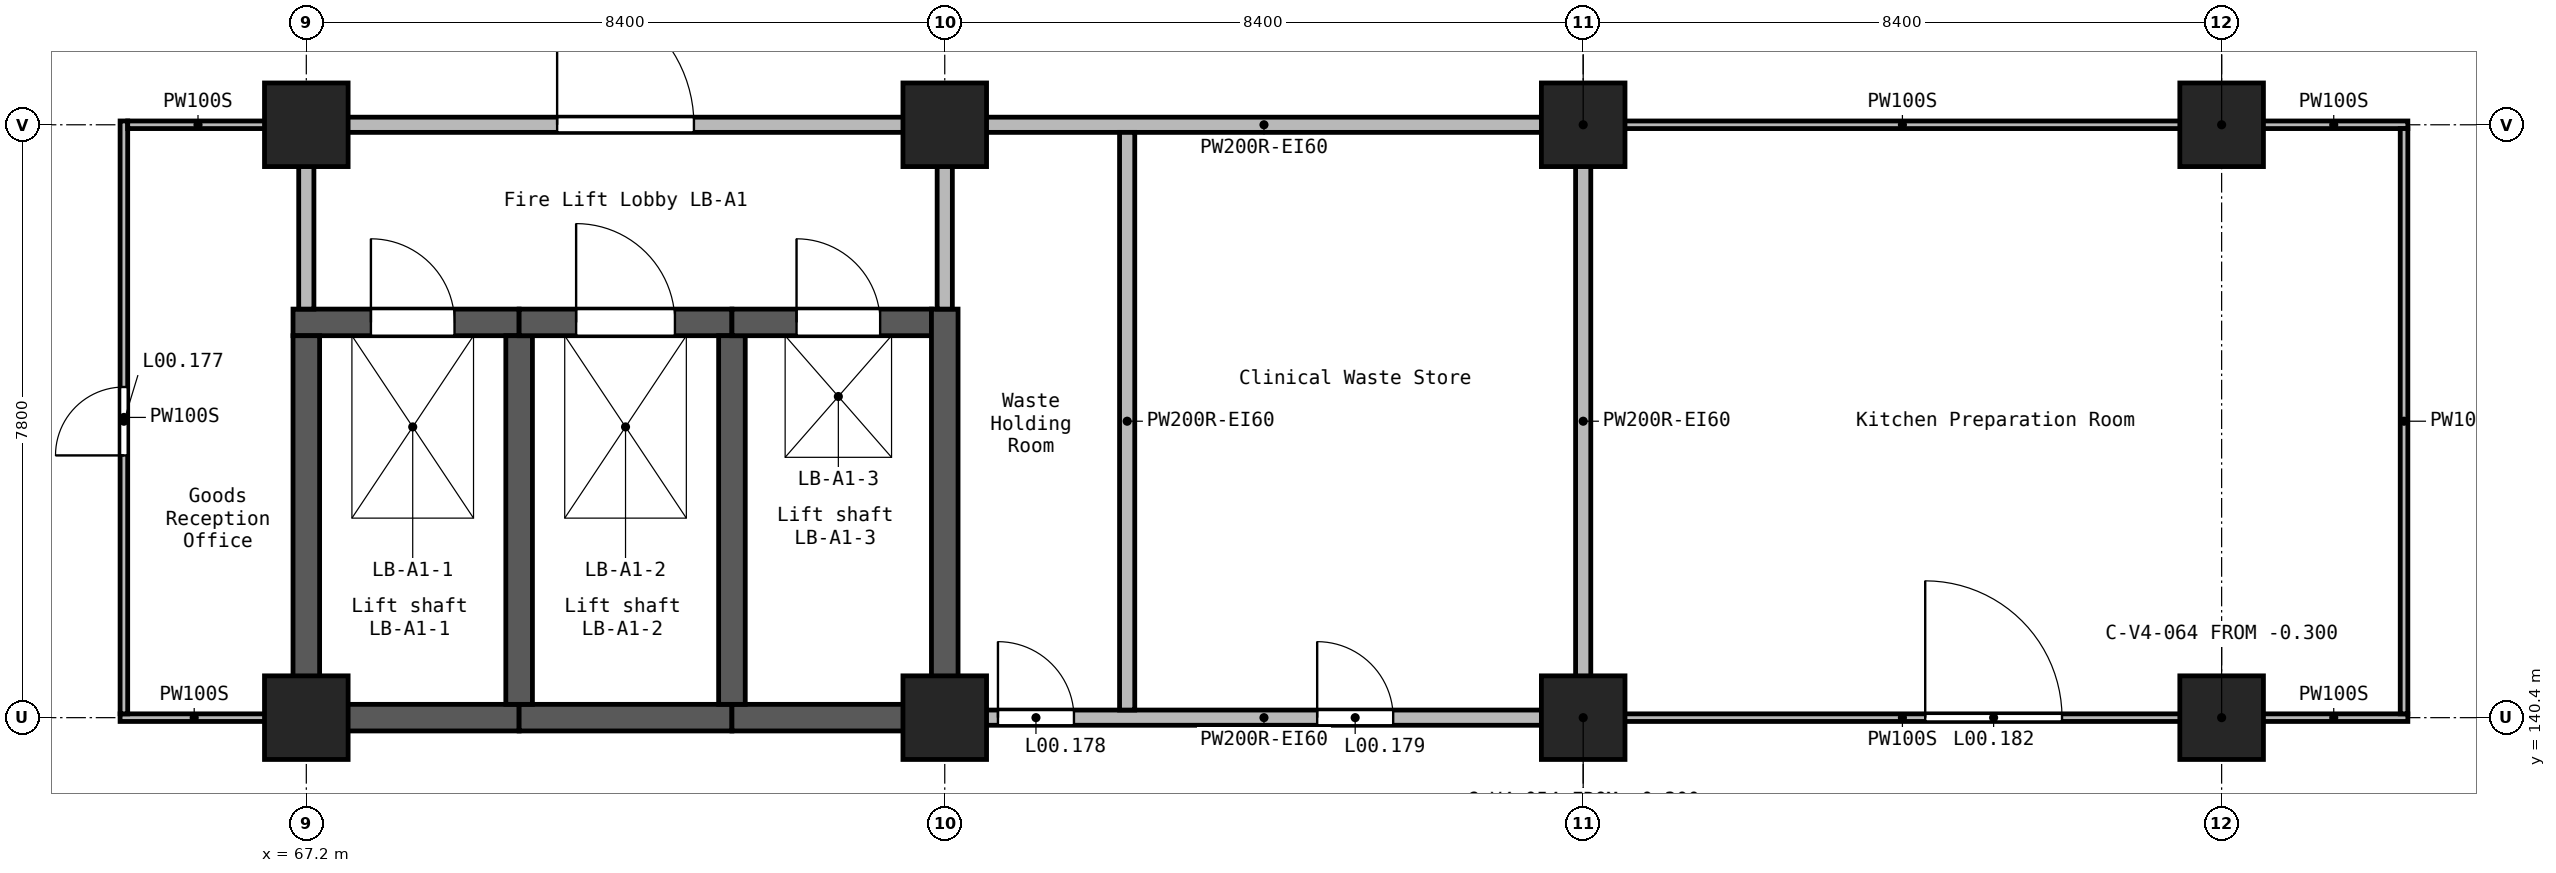
"""IFC4 building model, lengths in metres.
Left out: names, types, materials, properties, quantities, classifications, styles, units other than length and angle.
Written with IfcOpenShell. Run it as: python <this file> out.ifc"""

import sys

from ifc_helpers import new_model, si_unit, direction, frame, frame_2d, origin, origin_2d, place, context, subcontext, project, spatial, rectangle, extrude, element, fill, save


model = new_model("IFC4")
c1 = context("Model", 3, precision=1e-05, world=origin(), true_north=direction((0.0, 1.0)))
c2 = subcontext(c1, "Body", "Model", "MODEL_VIEW")
j1 = project(units=[si_unit("LENGTHUNIT", "METRE"), si_unit("PLANEANGLEUNIT", "RADIAN")], contexts=[c1])
p1 = place(None, origin())
s1 = spatial("IfcSite", under=j1, at=p1, CompositionType="ELEMENT")
p2 = place(p1, origin())
s2 = spatial("IfcBuilding", under=s1, at=p2, CompositionType="ELEMENT")
p3 = place(p2, origin())
s3 = spatial("IfcBuildingStorey", under=s2, at=p3, CompositionType="ELEMENT", Elevation=0.0)
for number, where, z_axis, x_axis in (
    (1, (67.2, 140.4, -0.3), (0.0, 0.0, 1.0), (1.0, 0.0, 0.0)),
    (2, (67.2, 148.2, -0.3), (0.0, 0.0, 1.0), (1.0, 0.0, 0.0)),
    (3, (75.6, 140.4, -0.3), (0.0, 0.0, 1.0), (1.0, 0.0, 0.0)),
    (4, (75.6, 148.2, -0.3), (0.0, 0.0, 1.0), (1.0, 0.0, 0.0)),
    (5, (84.0, 140.4, -0.3), (0.0, 0.0, 1.0), (1.0, 0.0, 0.0)),
    (6, (84.0, 148.2, -0.3), (0.0, 0.0, 1.0), (1.0, 0.0, 0.0)),
    (7, (92.4, 140.4, -0.3), (0.0, 0.0, 1.0), (1.0, 0.0, 0.0)),
    (8, (92.4, 148.2, -0.3), (0.0, 0.0, 1.0), (1.0, 0.0, 0.0)),
):
    element("IfcColumn", number, at=place(p3, frame(where, z_axis=z_axis, x_axis=x_axis)), inside=s3, PredefinedType="COLUMN", context=c2, shape_type="SweptSolid", body=[
        extrude(rectangle(XDim=1.1, YDim=1.1, at=origin_2d()), origin(), (0.0, 0.0, 1.0), 5.7),
    ])
p4 = place(p3, frame((67.025, 145.6, -0.3), z_axis=(0.0, 0.0, 1.0), x_axis=(1.0, 0.0, 0.0)))
e9 = element("IfcWall", 9, at=p4, inside=s3, PredefinedType="SHEAR", context=c2, shape_type="SweptSolid", body=[
    extrude(rectangle(XDim=2.975, YDim=0.35, at=frame_2d((1.488, 0.0))), origin(), (0.0, 0.0, 1.0), 5.7),
])
p5 = place(p4, frame((1.025, 0.0, 0.3)))
e10 = element("IfcOpeningElement", 10, at=p5, cuts=e9, PredefinedType="OPENING", context=c2, shape_type="SweptSolid", body=[
    extrude(rectangle(XDim=1.1, YDim=2.1, at=frame_2d((0.55, 1.05))), frame((0.0, 0.185, 0.0), z_axis=(0.0, -1.0, 0.0), x_axis=(1.0, 0.0, 0.0)), (0.0, 0.0, 1.0), 0.37),
])
p6 = place(p3, frame((67.2, 140.225, -0.3), z_axis=(0.0, 0.0, 1.0), x_axis=(0.0, 1.0, 0.0)))
e11 = element("IfcWall", 11, at=p6, inside=s3, PredefinedType="SHEAR", context=c2, shape_type="SweptSolid", body=[
    extrude(rectangle(XDim=5.2, YDim=0.35, at=frame_2d((2.6, 0.0))), origin(), (0.0, 0.0, 1.0), 5.7),
])
p7 = place(p3, frame((67.375, 140.4, -0.3), z_axis=(0.0, 0.0, 1.0), x_axis=(1.0, 0.0, 0.0)))
e12 = element("IfcWall", 12, at=p7, inside=s3, PredefinedType="SHEAR", context=c2, shape_type="SweptSolid", body=[
    extrude(rectangle(XDim=2.625, YDim=0.35, at=frame_2d((1.312, 0.0))), origin(), (0.0, 0.0, 1.0), 5.7),
])
p8 = place(p3, frame((70.0, 140.4, -0.3), z_axis=(0.0, 0.0, 1.0), x_axis=(1.0, 0.0, 0.0)))
e13 = element("IfcWall", 13, at=p8, inside=s3, PredefinedType="SHEAR", context=c2, shape_type="SweptSolid", body=[
    extrude(rectangle(XDim=2.8, YDim=0.35, at=frame_2d((1.4, 0.0))), origin(), (0.0, 0.0, 1.0), 5.7),
])
p9 = place(p3, frame((70.0, 140.575, -0.3), z_axis=(0.0, 0.0, 1.0), x_axis=(0.0, 1.0, 0.0)))
e14 = element("IfcWall", 14, at=p9, inside=s3, PredefinedType="SHEAR", context=c2, shape_type="SweptSolid", body=[
    extrude(rectangle(XDim=4.85, YDim=0.35, at=frame_2d((2.425, 0.0))), origin(), (0.0, 0.0, 1.0), 5.7),
])
p10 = place(p3, frame((70.0, 145.6, -0.3), z_axis=(0.0, 0.0, 1.0), x_axis=(1.0, 0.0, 0.0)))
e15 = element("IfcWall", 15, at=p10, inside=s3, PredefinedType="SHEAR", context=c2, shape_type="SweptSolid", body=[
    extrude(rectangle(XDim=2.8, YDim=0.35, at=frame_2d((1.4, 0.0))), origin(), (0.0, 0.0, 1.0), 5.7),
])
p11 = place(p10, frame((0.75, 0.0, 0.3)))
e16 = element("IfcOpeningElement", 16, at=p11, cuts=e15, PredefinedType="OPENING", context=c2, shape_type="SweptSolid", body=[
    extrude(rectangle(XDim=1.3, YDim=2.1, at=frame_2d((0.65, 1.05))), frame((0.0, 0.185, 0.0), z_axis=(0.0, -1.0, 0.0), x_axis=(1.0, 0.0, 0.0)), (0.0, 0.0, 1.0), 0.37),
])
p12 = place(p3, frame((72.8, 140.4, -0.3), z_axis=(0.0, 0.0, 1.0), x_axis=(1.0, 0.0, 0.0)))
e17 = element("IfcWall", 17, at=p12, inside=s3, PredefinedType="SHEAR", context=c2, shape_type="SweptSolid", body=[
    extrude(rectangle(XDim=2.625, YDim=0.35, at=frame_2d((1.312, 0.0))), origin(), (0.0, 0.0, 1.0), 5.7),
])
p13 = place(p3, frame((72.8, 140.575, -0.3), z_axis=(0.0, 0.0, 1.0), x_axis=(0.0, 1.0, 0.0)))
e18 = element("IfcWall", 18, at=p13, inside=s3, PredefinedType="SHEAR", context=c2, shape_type="SweptSolid", body=[
    extrude(rectangle(XDim=4.85, YDim=0.35, at=frame_2d((2.425, 0.0))), origin(), (0.0, 0.0, 1.0), 5.7),
])
p14 = place(p3, frame((72.8, 145.6, -0.3), z_axis=(0.0, 0.0, 1.0), x_axis=(1.0, 0.0, 0.0)))
e19 = element("IfcWall", 19, at=p14, inside=s3, PredefinedType="SHEAR", context=c2, shape_type="SweptSolid", body=[
    extrude(rectangle(XDim=2.625, YDim=0.35, at=frame_2d((1.312, 0.0))), origin(), (0.0, 0.0, 1.0), 5.7),
])
p15 = place(p14, frame((0.85, 0.0, 0.3)))
e20 = element("IfcOpeningElement", 20, at=p15, cuts=e19, PredefinedType="OPENING", context=c2, shape_type="SweptSolid", body=[
    extrude(rectangle(XDim=1.1, YDim=2.1, at=frame_2d((0.55, 1.05))), frame((0.0, 0.185, 0.0), z_axis=(0.0, -1.0, 0.0), x_axis=(1.0, 0.0, 0.0)), (0.0, 0.0, 1.0), 0.37),
])
p16 = place(p3, frame((75.6, 140.225, -0.3), z_axis=(0.0, 0.0, 1.0), x_axis=(0.0, 1.0, 0.0)))
e21 = element("IfcWall", 21, at=p16, inside=s3, PredefinedType="SHEAR", context=c2, shape_type="SweptSolid", body=[
    extrude(rectangle(XDim=5.55, YDim=0.35, at=frame_2d((2.775, 0.0))), origin(), (0.0, 0.0, 1.0), 5.7),
])
p17 = place(p3, frame((76.1, 140.4, 0.0), z_axis=(0.0, 0.0, 1.0), x_axis=(1.0, 0.0, 0.0)))
e22 = element("IfcWall", 22, at=p17, inside=s3, PredefinedType="SOLIDWALL", context=c2, shape_type="SweptSolid", body=[
    extrude(rectangle(XDim=7.4, YDim=0.2, at=frame_2d((3.7, 0.0))), origin(), (0.0, 0.0, 1.0), 5.05),
])
p18 = place(p17, frame((0.2, 0.0, 0.0)))
e23 = element("IfcOpeningElement", 23, at=p18, cuts=e22, PredefinedType="OPENING", context=c2, shape_type="SweptSolid", body=[
    extrude(rectangle(XDim=1.0, YDim=2.1, at=frame_2d((0.5, 1.05))), frame((0.0, 0.11, 0.0), z_axis=(0.0, -1.0, 0.0), x_axis=(1.0, 0.0, 0.0)), (0.0, 0.0, 1.0), 0.22),
])
p19 = place(p17, frame((4.4, 0.0, 0.0)))
e24 = element("IfcOpeningElement", 24, at=p19, cuts=e22, PredefinedType="OPENING", context=c2, shape_type="SweptSolid", body=[
    extrude(rectangle(XDim=1.0, YDim=2.1, at=frame_2d((0.5, 1.05))), frame((0.0, 0.11, 0.0), z_axis=(0.0, -1.0, 0.0), x_axis=(1.0, 0.0, 0.0)), (0.0, 0.0, 1.0), 0.22),
])
p20 = place(p3, frame((76.1, 148.2, 0.0), z_axis=(0.0, 0.0, 1.0), x_axis=(1.0, 0.0, 0.0)))
e25 = element("IfcWall", 25, at=p20, inside=s3, PredefinedType="SOLIDWALL", context=c2, shape_type="SweptSolid", body=[
    extrude(rectangle(XDim=7.4, YDim=0.2, at=frame_2d((3.7, 0.0))), origin(), (0.0, 0.0, 1.0), 5.05),
])
p21 = place(p3, frame((67.7, 148.2, 0.0), z_axis=(0.0, 0.0, 1.0), x_axis=(1.0, 0.0, 0.0)))
e26 = element("IfcWall", 26, at=p21, inside=s3, PredefinedType="SOLIDWALL", context=c2, shape_type="SweptSolid", body=[
    extrude(rectangle(XDim=7.4, YDim=0.2, at=frame_2d((3.7, 0.0))), origin(), (0.0, 0.0, 1.0), 5.05),
])
p22 = place(p21, frame((2.8, 0.0, 0.0)))
e27 = element("IfcOpeningElement", 27, at=p22, cuts=e26, PredefinedType="OPENING", context=c2, shape_type="SweptSolid", body=[
    extrude(rectangle(XDim=1.8, YDim=2.1, at=frame_2d((0.9, 1.05))), frame((0.0, 0.11, 0.0), z_axis=(0.0, -1.0, 0.0), x_axis=(1.0, 0.0, 0.0)), (0.0, 0.0, 1.0), 0.22),
])
p23 = place(p3, frame((78.0, 140.5, 0.0), z_axis=(0.0, 0.0, 1.0), x_axis=(0.0, 1.0, 0.0)))
e28 = element("IfcWall", 28, at=p23, inside=s3, PredefinedType="SOLIDWALL", context=c2, shape_type="SweptSolid", body=[
    extrude(rectangle(XDim=7.6, YDim=0.2, at=frame_2d((3.8, 0.0))), origin(), (0.0, 0.0, 1.0), 5.05),
])
p24 = place(p3, frame((84.0, 140.9, 0.0), z_axis=(0.0, 0.0, 1.0), x_axis=(0.0, 1.0, 0.0)))
e29 = element("IfcWall", 29, at=p24, inside=s3, PredefinedType="SOLIDWALL", context=c2, shape_type="SweptSolid", body=[
    extrude(rectangle(XDim=6.8, YDim=0.2, at=frame_2d((3.4, 0.0))), origin(), (0.0, 0.0, 1.0), 5.05),
])
for number, where, z_axis, x_axis in (
    (30, (67.2, 145.775, 0.0), (0.0, 0.0, 1.0), (0.0, 1.0, 0.0)),
    (31, (75.6, 145.775, 0.0), (0.0, 0.0, 1.0), (0.0, 1.0, 0.0)),
):
    element("IfcWall", number, at=place(p3, frame(where, z_axis=z_axis, x_axis=x_axis)), inside=s3, PredefinedType="SOLIDWALL", context=c2, shape_type="SweptSolid", body=[
        extrude(rectangle(XDim=1.925, YDim=0.2, at=frame_2d((0.962, 0.0))), origin(), (0.0, 0.0, 1.0), 5.05),
    ])
p25 = place(p3, frame((64.75, 140.4, 0.0), z_axis=(0.0, 0.0, 1.0), x_axis=(1.0, 0.0, 0.0)))
e32 = element("IfcWall", 32, at=p25, inside=s3, PredefinedType="PARTITIONING", context=c2, shape_type="SweptSolid", body=[
    extrude(rectangle(XDim=1.95, YDim=0.1, at=frame_2d((0.975, 0.0))), origin(), (0.0, 0.0, 1.0), 5.05),
])
p26 = place(p3, frame((84.5, 140.4, 0.0), z_axis=(0.0, 0.0, 1.0), x_axis=(1.0, 0.0, 0.0)))
e33 = element("IfcWall", 33, at=p26, inside=s3, PredefinedType="PARTITIONING", context=c2, shape_type="SweptSolid", body=[
    extrude(rectangle(XDim=7.4, YDim=0.1, at=frame_2d((3.7, 0.0))), origin(), (0.0, 0.0, 1.0), 5.05),
])
p27 = place(p26, frame((4.0, 0.0, 0.0)))
e34 = element("IfcOpeningElement", 34, at=p27, cuts=e33, PredefinedType="OPENING", context=c2, shape_type="SweptSolid", body=[
    extrude(rectangle(XDim=1.8, YDim=2.1, at=frame_2d((0.9, 1.05))), frame((0.0, 0.06, 0.0), z_axis=(0.0, -1.0, 0.0), x_axis=(1.0, 0.0, 0.0)), (0.0, 0.0, 1.0), 0.12),
])
p28 = place(p3, frame((92.9, 140.4, 0.0), z_axis=(0.0, 0.0, 1.0), x_axis=(1.0, 0.0, 0.0)))
e35 = element("IfcWall", 35, at=p28, inside=s3, PredefinedType="PARTITIONING", context=c2, shape_type="SweptSolid", body=[
    extrude(rectangle(XDim=1.95, YDim=0.1, at=frame_2d((0.975, 0.0))), origin(), (0.0, 0.0, 1.0), 5.05),
])
p29 = place(p3, frame((84.5, 148.2, 0.0), z_axis=(0.0, 0.0, 1.0), x_axis=(1.0, 0.0, 0.0)))
e36 = element("IfcWall", 36, at=p29, inside=s3, PredefinedType="PARTITIONING", context=c2, shape_type="SweptSolid", body=[
    extrude(rectangle(XDim=7.4, YDim=0.1, at=frame_2d((3.7, 0.0))), origin(), (0.0, 0.0, 1.0), 5.05),
])
p30 = place(p3, frame((92.9, 148.2, 0.0), z_axis=(0.0, 0.0, 1.0), x_axis=(1.0, 0.0, 0.0)))
e37 = element("IfcWall", 37, at=p30, inside=s3, PredefinedType="PARTITIONING", context=c2, shape_type="SweptSolid", body=[
    extrude(rectangle(XDim=1.95, YDim=0.1, at=frame_2d((0.975, 0.0))), origin(), (0.0, 0.0, 1.0), 5.05),
])
p31 = place(p3, frame((64.8, 140.45, 0.0), z_axis=(0.0, 0.0, 1.0), x_axis=(0.0, 1.0, 0.0)))
e38 = element("IfcWall", 38, at=p31, inside=s3, PredefinedType="PARTITIONING", context=c2, shape_type="SweptSolid", body=[
    extrude(rectangle(XDim=7.8, YDim=0.1, at=frame_2d((3.9, 0.0))), origin(), (0.0, 0.0, 1.0), 5.05),
])
p32 = place(p31, frame((3.4, 0.0, 0.0)))
e39 = element("IfcOpeningElement", 39, at=p32, cuts=e38, PredefinedType="OPENING", context=c2, shape_type="SweptSolid", body=[
    extrude(rectangle(XDim=0.9, YDim=2.1, at=frame_2d((0.45, 1.05))), frame((0.0, 0.06, 0.0), z_axis=(0.0, -1.0, 0.0), x_axis=(1.0, 0.0, 0.0)), (0.0, 0.0, 1.0), 0.12),
])
p33 = place(p3, frame((94.8, 140.45, 0.0), z_axis=(0.0, 0.0, 1.0), x_axis=(0.0, 1.0, 0.0)))
e40 = element("IfcWall", 40, at=p33, inside=s3, PredefinedType="PARTITIONING", context=c2, shape_type="SweptSolid", body=[
    extrude(rectangle(XDim=7.7, YDim=0.1, at=frame_2d((3.85, 0.0))), origin(), (0.0, 0.0, 1.0), 5.05),
])
p34 = place(p3, frame((64.85, 148.2, 0.0), z_axis=(0.0, 0.0, 1.0), x_axis=(1.0, 0.0, 0.0)))
e41 = element("IfcWall", 41, at=p34, inside=s3, PredefinedType="PARTITIONING", context=c2, shape_type="SweptSolid", body=[
    extrude(rectangle(XDim=1.85, YDim=0.1, at=frame_2d((0.925, 0.0))), origin(), (0.0, 0.0, 1.0), 5.05),
])
p35 = place(p22, frame((1.8, 0.0, 0.0), z_axis=(0.0, 0.0, 1.0), x_axis=(-1.0, 0.0, 0.0)))
e42 = element("IfcDoor", 42, at=p35, inside=s3, OperationType="DOUBLE_DOOR_SINGLE_SWING", PredefinedType="DOOR", context=c2, shape_type="SweptSolid", body=[
    extrude(rectangle(XDim=1.8, YDim=2.1, at=frame_2d((0.9, 1.05))), frame((0.0, 0.025, 0.0), z_axis=(0.0, -1.0, 0.0), x_axis=(1.0, 0.0, 0.0)), (0.0, 0.0, 1.0), 0.05),
])
fill(e27, e42)
p36 = place(p32, frame((0.9, 0.0, 0.0), z_axis=(0.0, 0.0, 1.0), x_axis=(-1.0, 0.0, 0.0)))
e43 = element("IfcDoor", 43, at=p36, inside=s3, OperationType="SINGLE_SWING_RIGHT", PredefinedType="DOOR", context=c2, shape_type="SweptSolid", body=[
    extrude(rectangle(XDim=0.9, YDim=2.1, at=frame_2d((0.45, 1.05))), frame((0.0, 0.025, 0.0), z_axis=(0.0, -1.0, 0.0), x_axis=(1.0, 0.0, 0.0)), (0.0, 0.0, 1.0), 0.05),
])
fill(e39, e43)
p37 = place(p18, origin())
e44 = element("IfcDoor", 44, at=p37, inside=s3, OperationType="SINGLE_SWING_LEFT", PredefinedType="DOOR", context=c2, shape_type="SweptSolid", body=[
    extrude(rectangle(XDim=1.0, YDim=2.1, at=frame_2d((0.5, 1.05))), frame((0.0, 0.025, 0.0), z_axis=(0.0, -1.0, 0.0), x_axis=(1.0, 0.0, 0.0)), (0.0, 0.0, 1.0), 0.05),
])
fill(e23, e44)
p38 = place(p19, origin())
e45 = element("IfcDoor", 45, at=p38, inside=s3, OperationType="SINGLE_SWING_RIGHT", PredefinedType="DOOR", context=c2, shape_type="SweptSolid", body=[
    extrude(rectangle(XDim=1.0, YDim=2.1, at=frame_2d((0.5, 1.05))), frame((0.0, 0.025, 0.0), z_axis=(0.0, -1.0, 0.0), x_axis=(1.0, 0.0, 0.0)), (0.0, 0.0, 1.0), 0.05),
])
fill(e24, e45)
p39 = place(p27, origin())
e46 = element("IfcDoor", 46, at=p39, inside=s3, OperationType="DOUBLE_DOOR_SINGLE_SWING", PredefinedType="DOOR", context=c2, shape_type="SweptSolid", body=[
    extrude(rectangle(XDim=1.8, YDim=2.1, at=frame_2d((0.9, 1.05))), frame((0.0, 0.025, 0.0), z_axis=(0.0, -1.0, 0.0), x_axis=(1.0, 0.0, 0.0)), (0.0, 0.0, 1.0), 0.05),
])
fill(e34, e46)
p40 = place(p5, origin())
e47 = element("IfcDoor", 47, at=p40, inside=s3, OperationType="DOUBLE_DOOR_SLIDING", PredefinedType="DOOR", context=c2, shape_type="SweptSolid", body=[
    extrude(rectangle(XDim=1.1, YDim=2.1, at=frame_2d((0.55, 1.05))), frame((0.0, 0.025, 0.0), z_axis=(0.0, -1.0, 0.0), x_axis=(1.0, 0.0, 0.0)), (0.0, 0.0, 1.0), 0.05),
])
fill(e10, e47)
p41 = place(p11, origin())
e48 = element("IfcDoor", 48, at=p41, inside=s3, OperationType="DOUBLE_DOOR_SLIDING", PredefinedType="DOOR", context=c2, shape_type="SweptSolid", body=[
    extrude(rectangle(XDim=1.3, YDim=2.1, at=frame_2d((0.65, 1.05))), frame((0.0, 0.025, 0.0), z_axis=(0.0, -1.0, 0.0), x_axis=(1.0, 0.0, 0.0)), (0.0, 0.0, 1.0), 0.05),
])
fill(e16, e48)
p42 = place(p15, origin())
e49 = element("IfcDoor", 49, at=p42, inside=s3, OperationType="DOUBLE_DOOR_SLIDING", PredefinedType="DOOR", context=c2, shape_type="SweptSolid", body=[
    extrude(rectangle(XDim=1.1, YDim=2.1, at=frame_2d((0.55, 1.05))), frame((0.0, 0.025, 0.0), z_axis=(0.0, -1.0, 0.0), x_axis=(1.0, 0.0, 0.0)), (0.0, 0.0, 1.0), 0.05),
])
fill(e20, e49)
save(model, sys.argv[1])
